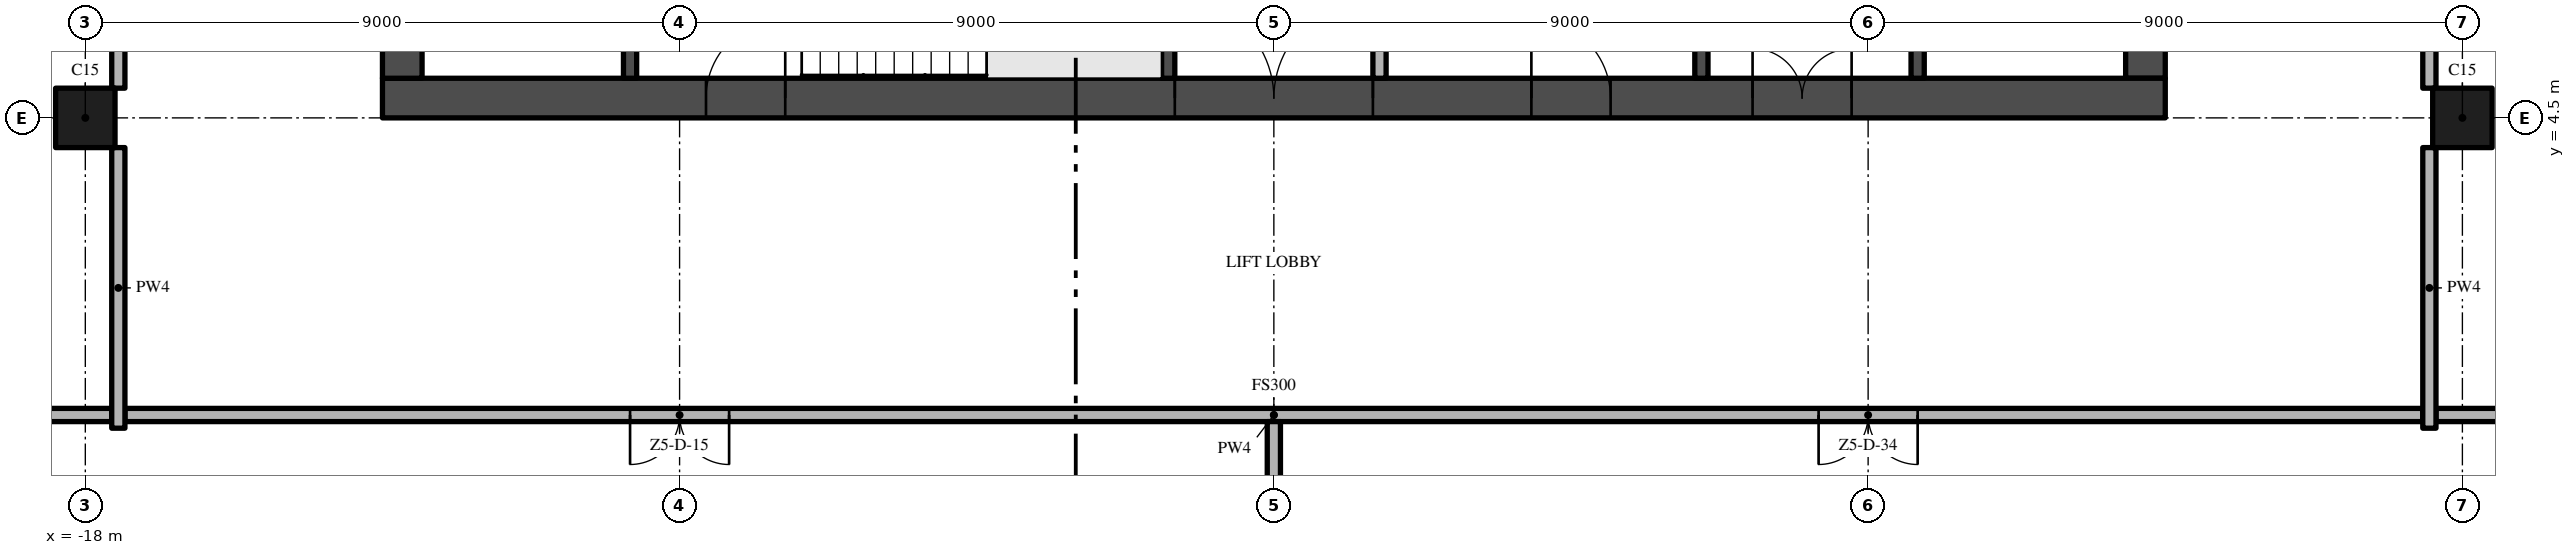
"""IFC4 building model, lengths in metres.
Left out: names, types, materials, properties, quantities, classifications, styles, units other than length and angle.
Written with IfcOpenShell. Run it as: python <this file> out.ifc"""

import sys

from ifc_helpers import new_model, si_unit, direction, frame, frame_2d, origin, origin_2d, place, context, subcontext, project, spatial, rectangle, extrude, element, fill, save


model = new_model("IFC4")
c1 = context("Model", 3, precision=1e-05, world=origin(), true_north=direction((0.0, 1.0)))
c2 = subcontext(c1, "Body", "Model", "MODEL_VIEW")
j1 = project(units=[si_unit("LENGTHUNIT", "METRE"), si_unit("PLANEANGLEUNIT", "RADIAN")], contexts=[c1])
p1 = place(None, origin())
s1 = spatial("IfcSite", under=j1, at=p1, CompositionType="ELEMENT")
p2 = place(p1, origin())
s2 = spatial("IfcBuilding", under=s1, at=p2, CompositionType="ELEMENT")
p3 = place(p2, frame((0.0, 0.0, 280.6)))
s3 = spatial("IfcBuildingStorey", under=s2, at=p3, CompositionType="ELEMENT", Elevation=280.6)
p4 = place(p3, frame((-13.5, 4.8, -0.3), z_axis=(0.0, 0.0, 1.0), x_axis=(1.0, 0.0, 0.0)))
e1 = element("IfcWall", 1, at=p4, inside=s3, PredefinedType="SHEAR", context=c2, shape_type="SweptSolid", body=[
    extrude(rectangle(XDim=27.0, YDim=0.6, at=frame_2d((13.5, 0.0))), origin(), (0.0, 0.0, 1.0), 3.8),
])
p5 = place(p4, frame((12.0, 0.0, 0.3)))
e2 = element("IfcOpeningElement", 2, at=p5, cuts=e1, PredefinedType="OPENING", context=c2, shape_type="SweptSolid", body=[
    extrude(rectangle(XDim=3.0, YDim=2.4, at=frame_2d((1.5, 1.2))), frame((0.0, 0.31, 0.0), z_axis=(0.0, -1.0, 0.0), x_axis=(1.0, 0.0, 0.0)), (0.0, 0.0, 1.0), 0.62),
])
p6 = place(p4, frame((4.9, 0.0, 0.3)))
e3 = element("IfcOpeningElement", 3, at=p6, cuts=e1, PredefinedType="OPENING", context=c2, shape_type="SweptSolid", body=[
    extrude(rectangle(XDim=1.2, YDim=2.2, at=frame_2d((0.6, 1.1))), frame((0.0, 0.31, 0.0), z_axis=(0.0, -1.0, 0.0), x_axis=(1.0, 0.0, 0.0)), (0.0, 0.0, 1.0), 0.62),
])
p7 = place(p4, frame((20.75, 0.0, 0.3)))
e4 = element("IfcOpeningElement", 4, at=p7, cuts=e1, PredefinedType="OPENING", context=c2, shape_type="SweptSolid", body=[
    extrude(rectangle(XDim=1.5, YDim=2.2, at=frame_2d((0.75, 1.1))), frame((0.0, 0.31, 0.0), z_axis=(0.0, -1.0, 0.0), x_axis=(1.0, 0.0, 0.0)), (0.0, 0.0, 1.0), 0.62),
])
p8 = place(p4, frame((17.4, 0.0, 0.3)))
e5 = element("IfcOpeningElement", 5, at=p8, cuts=e1, PredefinedType="OPENING", context=c2, shape_type="SweptSolid", body=[
    extrude(rectangle(XDim=1.2, YDim=2.2, at=frame_2d((0.6, 1.1))), frame((0.0, 0.31, 0.0), z_axis=(0.0, -1.0, 0.0), x_axis=(1.0, 0.0, 0.0)), (0.0, 0.0, 1.0), 0.62),
])
p9 = place(p3, frame((13.2, 5.1, -0.3), z_axis=(0.0, 0.0, 1.0), x_axis=(0.0, 1.0, 0.0)))
e6 = element("IfcWall", 6, at=p9, inside=s3, PredefinedType="SHEAR", context=c2, shape_type="SweptSolid", body=[
    extrude(rectangle(XDim=16.8, YDim=0.6, at=frame_2d((8.4, 0.0))), origin(), (0.0, 0.0, 1.0), 3.8),
])
p10 = place(p9, frame((6.3, 0.0, 0.3)))
e7 = element("IfcOpeningElement", 7, at=p10, cuts=e6, PredefinedType="OPENING", context=c2, shape_type="SweptSolid", body=[
    extrude(rectangle(XDim=1.2, YDim=2.2, at=frame_2d((0.6, 1.1))), frame((0.0, 0.31, 0.0), z_axis=(0.0, -1.0, 0.0), x_axis=(1.0, 0.0, 0.0)), (0.0, 0.0, 1.0), 0.62),
])
p11 = place(p3, frame((-13.2, 21.9, -0.3), z_axis=(0.0, 0.0, 1.0), x_axis=(0.0, -1.0, 0.0)))
e8 = element("IfcWall", 8, at=p11, inside=s3, PredefinedType="SHEAR", context=c2, shape_type="SweptSolid", body=[
    extrude(rectangle(XDim=16.8, YDim=0.6, at=frame_2d((8.4, 0.0))), origin(), (0.0, 0.0, 1.0), 3.8),
])
p12 = place(p11, frame((9.3, 0.0, 0.3)))
e9 = element("IfcOpeningElement", 9, at=p12, cuts=e8, PredefinedType="OPENING", context=c2, shape_type="SweptSolid", body=[
    extrude(rectangle(XDim=1.2, YDim=2.2, at=frame_2d((0.6, 1.1))), frame((0.0, 0.31, 0.0), z_axis=(0.0, -1.0, 0.0), x_axis=(1.0, 0.0, 0.0)), (0.0, 0.0, 1.0), 0.62),
])
for number, where, z_axis, x_axis in (
    (10, (-18.0, 4.5, 0.0), (0.0, 0.0, 1.0), (1.0, 0.0, 0.0)),
    (11, (18.0, 4.5, 0.0), (0.0, 0.0, 1.0), (1.0, 0.0, 0.0)),
):
    element("IfcColumn", number, at=place(p3, frame(where, z_axis=z_axis, x_axis=x_axis)), inside=s3, PredefinedType="COLUMN", context=c2, shape_type="SweptSolid", body=[
        extrude(rectangle(XDim=0.9, YDim=0.9, at=origin_2d()), origin(), (0.0, 0.0, 1.0), 3.5),
    ])
for number, where, z_axis, x_axis in (
    (12, (-9.75, 5.1, 0.0), (0.0, 0.0, 1.0), (0.0, 1.0, 0.0)),
    (13, (-1.6, 5.1, 0.0), (0.0, 0.0, 1.0), (0.0, 1.0, 0.0)),
):
    element("IfcWall", number, at=place(p3, frame(where, z_axis=z_axis, x_axis=x_axis)), inside=s3, PredefinedType="SHEAR", context=c2, shape_type="SweptSolid", body=[
        extrude(rectangle(XDim=2.85, YDim=0.2, at=frame_2d((1.425, 0.0))), origin(), (0.0, 0.0, 1.0), 3.5),
    ])
p13 = place(p3, frame((1.6, 7.5, 0.0), z_axis=(0.0, 0.0, 1.0), x_axis=(0.0, -1.0, 0.0)))
e14 = element("IfcWall", 14, at=p13, inside=s3, PredefinedType="PARTITIONING", context=c2, shape_type="SweptSolid", body=[
    extrude(rectangle(XDim=2.4, YDim=0.2, at=frame_2d((1.2, 0.0))), origin(), (0.0, 0.0, 1.0), 3.5),
])
p14 = place(p13, frame((0.35, 0.0, 0.0)))
e15 = element("IfcOpeningElement", 15, at=p14, cuts=e14, PredefinedType="OPENING", context=c2, shape_type="SweptSolid", body=[
    extrude(rectangle(XDim=0.9, YDim=2.1, at=frame_2d((0.45, 1.05))), frame((0.0, 0.11, 0.0), z_axis=(0.0, -1.0, 0.0), x_axis=(1.0, 0.0, 0.0)), (0.0, 0.0, 1.0), 0.22),
])
p15 = place(p3, frame((6.475, 5.1, 0.0), z_axis=(0.0, 0.0, 1.0), x_axis=(0.0, 1.0, 0.0)))
e16 = element("IfcWall", 16, at=p15, inside=s3, PredefinedType="SHEAR", context=c2, shape_type="SweptSolid", body=[
    extrude(rectangle(XDim=2.4, YDim=0.2, at=frame_2d((1.2, 0.0))), origin(), (0.0, 0.0, 1.0), 3.5),
])
p16 = place(p3, frame((9.75, 5.1, 0.0), z_axis=(0.0, 0.0, 1.0), x_axis=(0.0, 1.0, 0.0)))
e17 = element("IfcWall", 17, at=p16, inside=s3, PredefinedType="SHEAR", context=c2, shape_type="SweptSolid", body=[
    extrude(rectangle(XDim=2.5, YDim=0.2, at=frame_2d((1.25, 0.0))), origin(), (0.0, 0.0, 1.0), 3.5),
])
p17 = place(p16, frame((0.85, 0.0, 0.0)))
e18 = element("IfcOpeningElement", 18, at=p17, cuts=e17, PredefinedType="OPENING", context=c2, shape_type="SweptSolid", body=[
    extrude(rectangle(XDim=1.1, YDim=2.1, at=frame_2d((0.55, 1.05))), frame((0.0, 0.11, 0.0), z_axis=(0.0, -1.0, 0.0), x_axis=(1.0, 0.0, 0.0)), (0.0, 0.0, 1.0), 0.22),
])
p18 = place(p3, frame((17.4, 0.0, 0.0), z_axis=(0.0, 0.0, 1.0), x_axis=(-1.0, 0.0, 0.0)))
e19 = element("IfcWall", 19, at=p18, inside=s3, PredefinedType="PARTITIONING", context=c2, shape_type="SweptSolid", body=[
    extrude(rectangle(XDim=34.8, YDim=0.2, at=frame_2d((17.4, 0.0))), origin(), (0.0, 0.0, 1.0), 3.5),
])
p19 = place(p18, frame((25.65, 0.0, 0.0)))
e20 = element("IfcOpeningElement", 20, at=p19, cuts=e19, PredefinedType="OPENING", context=c2, shape_type="SweptSolid", body=[
    extrude(rectangle(XDim=1.5, YDim=2.4, at=frame_2d((0.75, 1.2))), frame((0.0, 0.11, 0.0), z_axis=(0.0, -1.0, 0.0), x_axis=(1.0, 0.0, 0.0)), (0.0, 0.0, 1.0), 0.22),
])
p20 = place(p18, frame((7.65, 0.0, 0.0)))
e21 = element("IfcOpeningElement", 21, at=p20, cuts=e19, PredefinedType="OPENING", context=c2, shape_type="SweptSolid", body=[
    extrude(rectangle(XDim=1.5, YDim=2.4, at=frame_2d((0.75, 1.2))), frame((0.0, 0.11, 0.0), z_axis=(0.0, -1.0, 0.0), x_axis=(1.0, 0.0, 0.0)), (0.0, 0.0, 1.0), 0.22),
])
for number, where, z_axis, x_axis in (
    (22, (-26.7, 0.0, 0.0), (0.0, 0.0, 1.0), (1.0, 0.0, 0.0)),
    (23, (17.6, 0.0, 0.0), (0.0, 0.0, 1.0), (1.0, 0.0, 0.0)),
):
    element("IfcWall", number, at=place(p3, frame(where, z_axis=z_axis, x_axis=x_axis)), inside=s3, PredefinedType="PARTITIONING", context=c2, shape_type="SweptSolid", body=[
        extrude(rectangle(XDim=9.1, YDim=0.2, at=frame_2d((4.55, 0.0))), origin(), (0.0, 0.0, 1.0), 3.5),
    ])
p21 = place(p3, frame((-17.5, -0.2, 0.0), z_axis=(0.0, 0.0, 1.0), x_axis=(0.0, 1.0, 0.0)))
e24 = element("IfcWall", 24, at=p21, inside=s3, PredefinedType="PARTITIONING", context=c2, shape_type="SweptSolid", body=[
    extrude(rectangle(XDim=4.25, YDim=0.2, at=frame_2d((2.125, 0.0))), origin(), (0.0, 0.0, 1.0), 3.5),
])
p22 = place(p3, frame((-17.5, 4.95, 0.0), z_axis=(0.0, 0.0, 1.0), x_axis=(0.0, 1.0, 0.0)))
e25 = element("IfcWall", 25, at=p22, inside=s3, PredefinedType="PARTITIONING", context=c2, shape_type="SweptSolid", body=[
    extrude(rectangle(XDim=8.1, YDim=0.2, at=frame_2d((4.05, 0.0))), origin(), (0.0, 0.0, 1.0), 3.5),
])
p23 = place(p22, frame((1.2, 0.0, 0.0)))
e26 = element("IfcOpeningElement", 26, at=p23, cuts=e25, PredefinedType="OPENING", context=c2, shape_type="SweptSolid", body=[
    extrude(rectangle(XDim=1.2, YDim=2.4, at=frame_2d((0.6, 1.2))), frame((0.0, 0.11, 0.0), z_axis=(0.0, -1.0, 0.0), x_axis=(1.0, 0.0, 0.0)), (0.0, 0.0, 1.0), 0.22),
])
p24 = place(p3, frame((0.0, -4.05, 0.0), z_axis=(0.0, 0.0, 1.0), x_axis=(0.0, 1.0, 0.0)))
e27 = element("IfcWall", 27, at=p24, inside=s3, PredefinedType="PARTITIONING", context=c2, shape_type="SweptSolid", body=[
    extrude(rectangle(XDim=3.95, YDim=0.2, at=frame_2d((1.975, 0.0))), origin(), (0.0, 0.0, 1.0), 3.5),
])
p25 = place(p3, frame((17.5, -0.2, 0.0), z_axis=(0.0, 0.0, 1.0), x_axis=(0.0, 1.0, 0.0)))
e28 = element("IfcWall", 28, at=p25, inside=s3, PredefinedType="PARTITIONING", context=c2, shape_type="SweptSolid", body=[
    extrude(rectangle(XDim=4.25, YDim=0.2, at=frame_2d((2.125, 0.0))), origin(), (0.0, 0.0, 1.0), 3.5),
])
p26 = place(p3, frame((17.5, 13.05, 0.0), z_axis=(0.0, 0.0, 1.0), x_axis=(0.0, -1.0, 0.0)))
e29 = element("IfcWall", 29, at=p26, inside=s3, PredefinedType="PARTITIONING", context=c2, shape_type="SweptSolid", body=[
    extrude(rectangle(XDim=8.1, YDim=0.2, at=frame_2d((4.05, 0.0))), origin(), (0.0, 0.0, 1.0), 3.5),
])
p27 = place(p26, frame((3.45, 0.0, 0.0)))
e30 = element("IfcOpeningElement", 30, at=p27, cuts=e29, PredefinedType="OPENING", context=c2, shape_type="SweptSolid", body=[
    extrude(rectangle(XDim=1.2, YDim=2.4, at=frame_2d((0.6, 1.2))), frame((0.0, 0.11, 0.0), z_axis=(0.0, -1.0, 0.0), x_axis=(1.0, 0.0, 0.0)), (0.0, 0.0, 1.0), 0.22),
])
p28 = place(p5, frame((3.0, 0.0, 0.0), z_axis=(0.0, 0.0, 1.0), x_axis=(-1.0, 0.0, 0.0)))
e31 = element("IfcDoor", 31, at=p28, inside=s3, OperationType="DOUBLE_DOOR_SINGLE_SWING", PredefinedType="DOOR", context=c2, shape_type="SweptSolid", body=[
    extrude(rectangle(XDim=3.0, YDim=2.4, at=frame_2d((1.5, 1.2))), frame((0.0, 0.025, 0.0), z_axis=(0.0, -1.0, 0.0), x_axis=(1.0, 0.0, 0.0)), (0.0, 0.0, 1.0), 0.05),
])
fill(e2, e31)
p29 = place(p6, frame((1.2, 0.0, 0.0), z_axis=(0.0, 0.0, 1.0), x_axis=(-1.0, 0.0, 0.0)))
e32 = element("IfcDoor", 32, at=p29, inside=s3, OperationType="SINGLE_SWING_LEFT", PredefinedType="DOOR", context=c2, shape_type="SweptSolid", body=[
    extrude(rectangle(XDim=1.2, YDim=2.2, at=frame_2d((0.6, 1.1))), frame((0.0, 0.025, 0.0), z_axis=(0.0, -1.0, 0.0), x_axis=(1.0, 0.0, 0.0)), (0.0, 0.0, 1.0), 0.05),
])
fill(e3, e32)
p30 = place(p7, frame((1.5, 0.0, 0.0), z_axis=(0.0, 0.0, 1.0), x_axis=(-1.0, 0.0, 0.0)))
e33 = element("IfcDoor", 33, at=p30, inside=s3, OperationType="DOUBLE_DOOR_SINGLE_SWING", PredefinedType="DOOR", context=c2, shape_type="SweptSolid", body=[
    extrude(rectangle(XDim=1.5, YDim=2.2, at=frame_2d((0.75, 1.1))), frame((0.0, 0.025, 0.0), z_axis=(0.0, -1.0, 0.0), x_axis=(1.0, 0.0, 0.0)), (0.0, 0.0, 1.0), 0.05),
])
fill(e4, e33)
p31 = place(p8, frame((1.2, 0.0, 0.0), z_axis=(0.0, 0.0, 1.0), x_axis=(-1.0, 0.0, 0.0)))
e34 = element("IfcDoor", 34, at=p31, inside=s3, OperationType="SINGLE_SWING_RIGHT", PredefinedType="DOOR", context=c2, shape_type="SweptSolid", body=[
    extrude(rectangle(XDim=1.2, YDim=2.2, at=frame_2d((0.6, 1.1))), frame((0.0, 0.025, 0.0), z_axis=(0.0, -1.0, 0.0), x_axis=(1.0, 0.0, 0.0)), (0.0, 0.0, 1.0), 0.05),
])
fill(e5, e34)
p32 = place(p19, origin())
e35 = element("IfcDoor", 35, at=p32, inside=s3, OperationType="DOUBLE_DOOR_SINGLE_SWING", PredefinedType="DOOR", context=c2, shape_type="SweptSolid", body=[
    extrude(rectangle(XDim=1.5, YDim=2.4, at=frame_2d((0.75, 1.2))), frame((0.0, 0.025, 0.0), z_axis=(0.0, -1.0, 0.0), x_axis=(1.0, 0.0, 0.0)), (0.0, 0.0, 1.0), 0.05),
])
fill(e20, e35)
p33 = place(p20, origin())
e36 = element("IfcDoor", 36, at=p33, inside=s3, OperationType="DOUBLE_DOOR_SINGLE_SWING", PredefinedType="DOOR", context=c2, shape_type="SweptSolid", body=[
    extrude(rectangle(XDim=1.5, YDim=2.4, at=frame_2d((0.75, 1.2))), frame((0.0, 0.025, 0.0), z_axis=(0.0, -1.0, 0.0), x_axis=(1.0, 0.0, 0.0)), (0.0, 0.0, 1.0), 0.05),
])
fill(e21, e36)
save(model, sys.argv[1])
